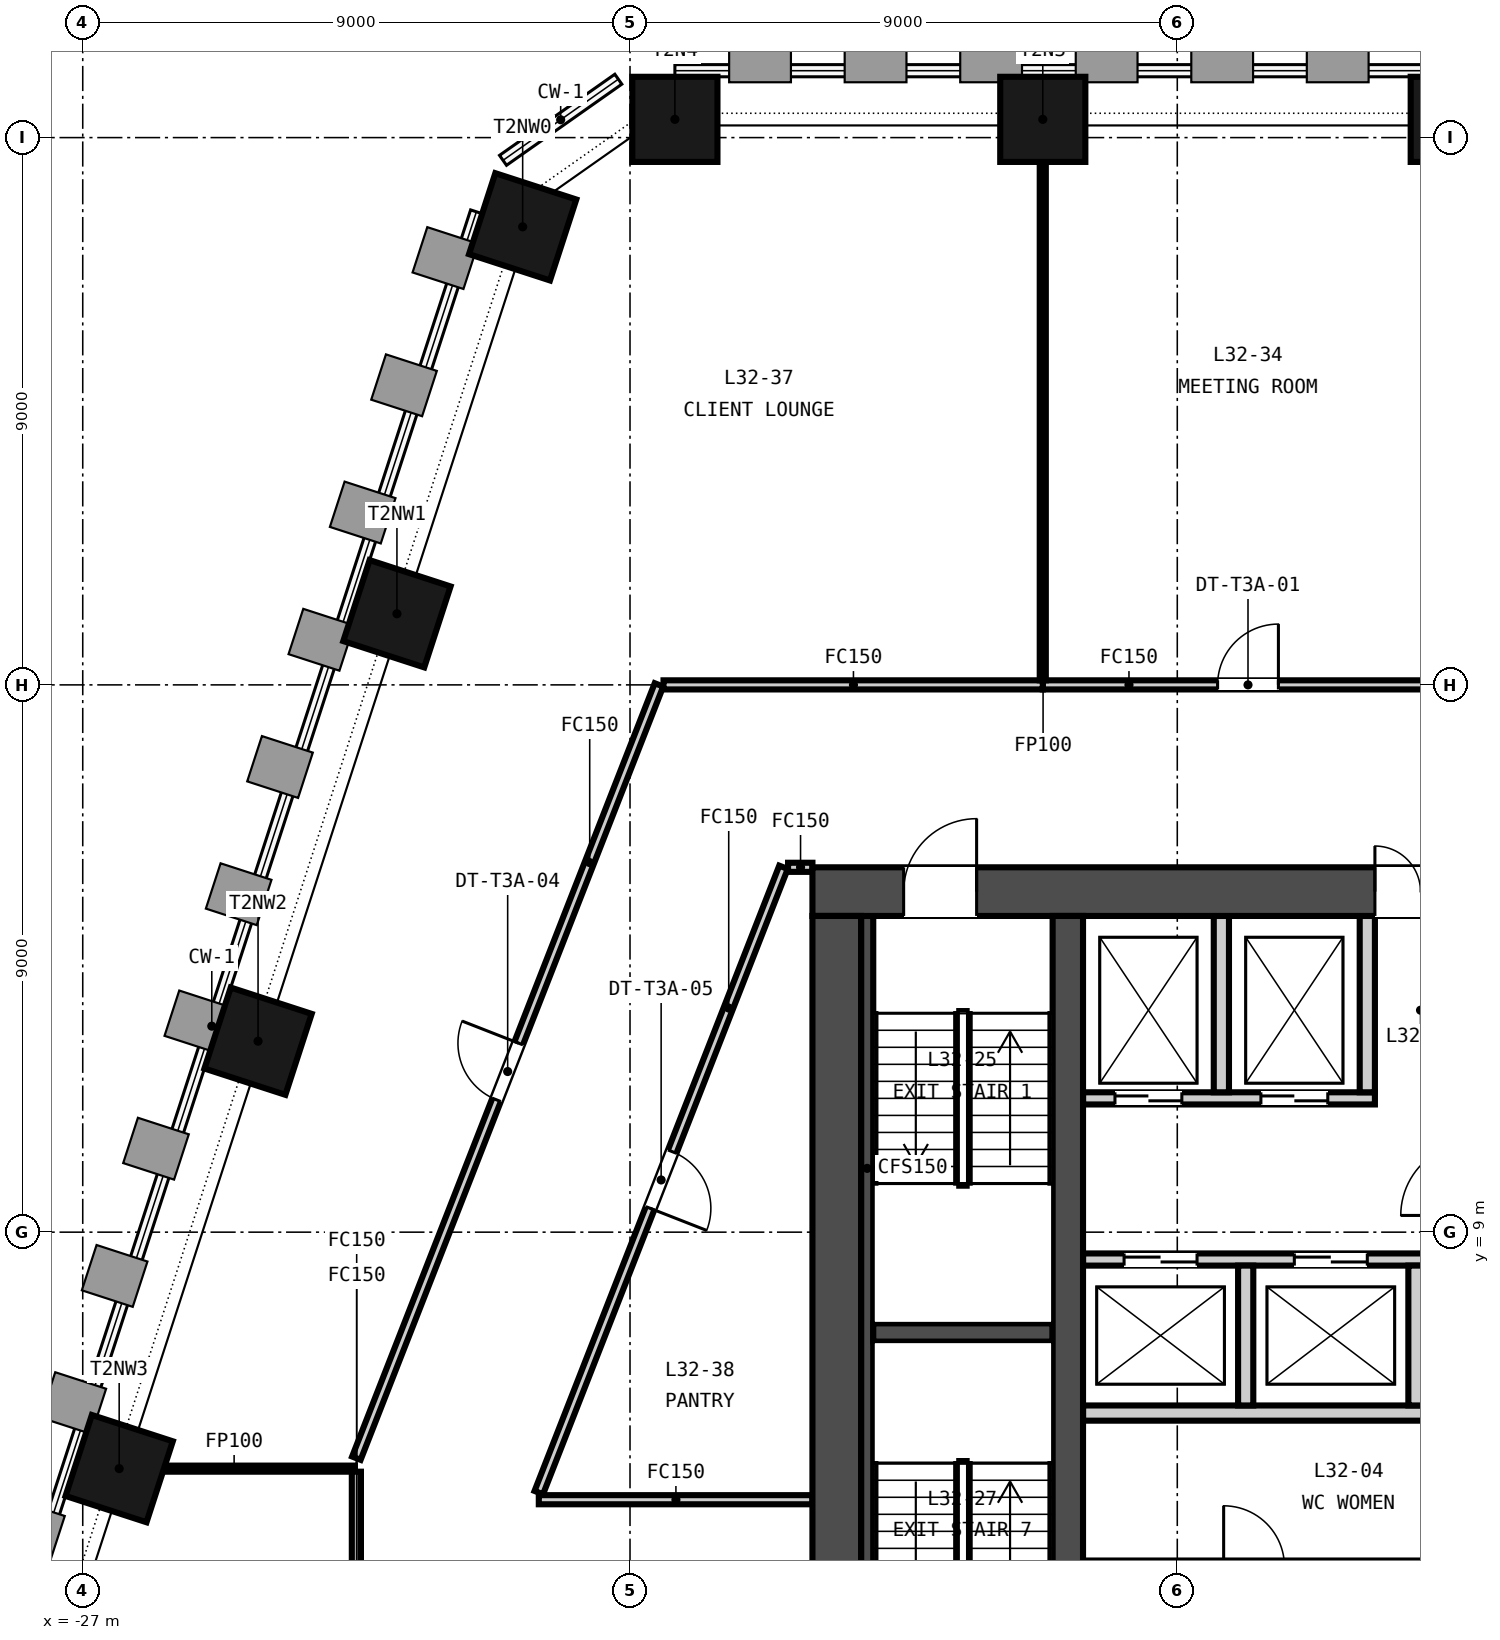
"""IFC4 building model, lengths in metres.
Left out: names, types, materials, properties, quantities, classifications, styles, units other than length and angle.
Written with IfcOpenShell. Run it as: python <this file> out.ifc"""

import sys

from ifc_helpers import new_model, si_unit, direction, frame, frame_2d, origin, origin_2d, place, context, subcontext, project, spatial, rectangle, extrude, element, fill, save


model = new_model("IFC4")
c1 = context("Model", 3, precision=1e-05, world=origin(), true_north=direction((0.0, 1.0)))
c2 = subcontext(c1, "Body", "Model", "MODEL_VIEW")
j1 = project(units=[si_unit("LENGTHUNIT", "METRE"), si_unit("PLANEANGLEUNIT", "RADIAN")], contexts=[c1])
p1 = place(None, origin())
s1 = spatial("IfcSite", under=j1, at=p1, CompositionType="ELEMENT")
p2 = place(p1, origin())
s2 = spatial("IfcBuilding", under=s1, at=p2, CompositionType="ELEMENT")
p3 = place(p2, frame((0.0, 0.0, 133.45)))
s3 = spatial("IfcBuildingStorey", under=s2, at=p3, CompositionType="ELEMENT", Elevation=133.45)
p4 = place(p3, frame((-15.0, 14.6, -0.15), z_axis=(0.0, 0.0, 1.0), x_axis=(1.0, 0.0, 0.0)))
e1 = element("IfcWall", 1, at=p4, inside=s3, PredefinedType="SOLIDWALL", context=c2, shape_type="SweptSolid", body=[
    extrude(rectangle(XDim=30.0, YDim=0.8, at=frame_2d((15.0, 0.0))), origin(), (0.0, 0.0, 1.0), 3.65),
])
p5 = place(p4, frame((9.25, 0.0, 0.15)))
e2 = element("IfcOpeningElement", 2, at=p5, cuts=e1, PredefinedType="OPENING", context=c2, shape_type="SweptSolid", body=[
    extrude(rectangle(XDim=1.5, YDim=2.1, at=frame_2d((0.75, 1.05))), frame((0.0, 0.41, 0.0), z_axis=(0.0, -1.0, 0.0), x_axis=(1.0, 0.0, 0.0)), (0.0, 0.0, 1.0), 0.82),
])
p6 = place(p4, frame((19.4, 0.0, 0.15)))
e3 = element("IfcOpeningElement", 3, at=p6, cuts=e1, PredefinedType="OPENING", context=c2, shape_type="SweptSolid", body=[
    extrude(rectangle(XDim=1.5, YDim=2.1, at=frame_2d((0.75, 1.05))), frame((0.0, 0.41, 0.0), z_axis=(0.0, -1.0, 0.0), x_axis=(1.0, 0.0, 0.0)), (0.0, 0.0, 1.0), 0.82),
])
p7 = place(p4, frame((1.5, 0.0, 0.15)))
e4 = element("IfcOpeningElement", 4, at=p7, cuts=e1, PredefinedType="OPENING", context=c2, shape_type="SweptSolid", body=[
    extrude(rectangle(XDim=1.2, YDim=2.1, at=frame_2d((0.6, 1.05))), frame((0.0, 0.41, 0.0), z_axis=(0.0, -1.0, 0.0), x_axis=(1.0, 0.0, 0.0)), (0.0, 0.0, 1.0), 0.82),
])
p8 = place(p4, frame((27.3, 0.0, 0.15)))
e5 = element("IfcOpeningElement", 5, at=p8, cuts=e1, PredefinedType="OPENING", context=c2, shape_type="SweptSolid", body=[
    extrude(rectangle(XDim=1.2, YDim=2.1, at=frame_2d((0.6, 1.05))), frame((0.0, 0.41, 0.0), z_axis=(0.0, -1.0, 0.0), x_axis=(1.0, 0.0, 0.0)), (0.0, 0.0, 1.0), 0.82),
])
p9 = place(p3, frame((-14.6, 0.8, -0.15), z_axis=(0.0, 0.0, 1.0), x_axis=(0.0, 1.0, 0.0)))
e6 = element("IfcWall", 6, at=p9, inside=s3, PredefinedType="SOLIDWALL", context=c2, shape_type="SweptSolid", body=[
    extrude(rectangle(XDim=13.4, YDim=0.8, at=frame_2d((6.7, 0.0))), origin(), (0.0, 0.0, 1.0), 3.65),
])
p10 = place(p3, frame((-10.8, 0.8, -0.15), z_axis=(0.0, 0.0, 1.0), x_axis=(0.0, 1.0, 0.0)))
e7 = element("IfcWall", 7, at=p10, inside=s3, PredefinedType="SOLIDWALL", context=c2, shape_type="SweptSolid", body=[
    extrude(rectangle(XDim=13.4, YDim=0.5, at=frame_2d((6.7, 0.0))), origin(), (0.0, 0.0, 1.0), 3.65),
])
for number, where, z_axis, x_axis in (
    (8, (-4.462, 27.3, -0.15), (0.0, 0.0, 1.0), (-1.0, 0.0, 0.0)),
    (9, (-11.212, 27.3, -0.15), (0.0, 0.0, 1.0), (-1.0, 0.0, 0.0)),
    (10, (-17.262, 27.3, -0.15), (0.0, 0.0, 1.0), (-1.0, 0.0, 0.0)),
    (11, (-19.765, 25.533, -0.15), (0.0, 0.0, 1.0), (-0.309, -0.951, 0.0)),
    (12, (-21.833, 19.17, -0.15), (0.0, 0.0, 1.0), (-0.309, -0.951, 0.0)),
    (13, (-24.117, 12.141, -0.15), (0.0, 0.0, 1.0), (-0.309, -0.951, 0.0)),
    (14, (-26.401, 5.111, -0.15), (0.0, 0.0, 1.0), (-0.309, -0.951, 0.0)),
):
    element("IfcColumn", number, at=place(p3, frame(where, z_axis=z_axis, x_axis=x_axis)), inside=s3, PredefinedType="COLUMN", context=c2, shape_type="SweptSolid", body=[
        extrude(rectangle(XDim=1.4, YDim=1.4, at=origin_2d()), origin(), (0.0, 0.0, 1.0), 3.65),
    ])
p11 = place(p3, frame((-10.55, 6.025, 0.0), z_axis=(0.0, 0.0, 1.0), x_axis=(1.0, 0.0, 0.0)))
e15 = element("IfcWall", 15, at=p11, inside=s3, PredefinedType="PARTITIONING", context=c2, shape_type="SweptSolid", body=[
    extrude(rectangle(XDim=21.1, YDim=0.25, at=frame_2d((10.55, 0.0))), origin(), (0.0, 0.0, 1.0), 3.5),
])
p12 = place(p3, frame((-10.55, 8.55, 0.0), z_axis=(0.0, 0.0, 1.0), x_axis=(1.0, 0.0, 0.0)))
e16 = element("IfcWall", 16, at=p12, inside=s3, PredefinedType="PARTITIONING", context=c2, shape_type="SweptSolid", body=[
    extrude(rectangle(XDim=21.1, YDim=0.2, at=frame_2d((10.55, 0.0))), origin(), (0.0, 0.0, 1.0), 3.5),
])
p13 = place(p12, frame((0.675, 0.0, 0.0)))
e17 = element("IfcOpeningElement", 17, at=p13, cuts=e16, PredefinedType="OPENING", context=c2, shape_type="SweptSolid", body=[
    extrude(rectangle(XDim=1.2, YDim=2.1, at=frame_2d((0.6, 1.05))), frame((0.0, 0.11, 0.0), z_axis=(0.0, -1.0, 0.0), x_axis=(1.0, 0.0, 0.0)), (0.0, 0.0, 1.0), 0.22),
])
p14 = place(p12, frame((3.475, 0.0, 0.0)))
e18 = element("IfcOpeningElement", 18, at=p14, cuts=e16, PredefinedType="OPENING", context=c2, shape_type="SweptSolid", body=[
    extrude(rectangle(XDim=1.2, YDim=2.1, at=frame_2d((0.6, 1.05))), frame((0.0, 0.11, 0.0), z_axis=(0.0, -1.0, 0.0), x_axis=(1.0, 0.0, 0.0)), (0.0, 0.0, 1.0), 0.22),
])
p15 = place(p12, frame((6.275, 0.0, 0.0)))
e19 = element("IfcOpeningElement", 19, at=p15, cuts=e16, PredefinedType="OPENING", context=c2, shape_type="SweptSolid", body=[
    extrude(rectangle(XDim=1.2, YDim=2.1, at=frame_2d((0.6, 1.05))), frame((0.0, 0.11, 0.0), z_axis=(0.0, -1.0, 0.0), x_axis=(1.0, 0.0, 0.0)), (0.0, 0.0, 1.0), 0.22),
])
p16 = place(p12, frame((9.075, 0.0, 0.0)))
e20 = element("IfcOpeningElement", 20, at=p16, cuts=e16, PredefinedType="OPENING", context=c2, shape_type="SweptSolid", body=[
    extrude(rectangle(XDim=1.2, YDim=2.1, at=frame_2d((0.6, 1.05))), frame((0.0, 0.11, 0.0), z_axis=(0.0, -1.0, 0.0), x_axis=(1.0, 0.0, 0.0)), (0.0, 0.0, 1.0), 0.22),
])
p17 = place(p12, frame((11.875, 0.0, 0.0)))
e21 = element("IfcOpeningElement", 21, at=p17, cuts=e16, PredefinedType="OPENING", context=c2, shape_type="SweptSolid", body=[
    extrude(rectangle(XDim=1.2, YDim=2.1, at=frame_2d((0.6, 1.05))), frame((0.0, 0.11, 0.0), z_axis=(0.0, -1.0, 0.0), x_axis=(1.0, 0.0, 0.0)), (0.0, 0.0, 1.0), 0.22),
])
p18 = place(p12, frame((14.675, 0.0, 0.0)))
e22 = element("IfcOpeningElement", 22, at=p18, cuts=e16, PredefinedType="OPENING", context=c2, shape_type="SweptSolid", body=[
    extrude(rectangle(XDim=1.2, YDim=2.1, at=frame_2d((0.6, 1.05))), frame((0.0, 0.11, 0.0), z_axis=(0.0, -1.0, 0.0), x_axis=(1.0, 0.0, 0.0)), (0.0, 0.0, 1.0), 0.22),
])
p19 = place(p12, frame((17.475, 0.0, 0.0)))
e23 = element("IfcOpeningElement", 23, at=p19, cuts=e16, PredefinedType="OPENING", context=c2, shape_type="SweptSolid", body=[
    extrude(rectangle(XDim=1.2, YDim=2.1, at=frame_2d((0.6, 1.05))), frame((0.0, 0.11, 0.0), z_axis=(0.0, -1.0, 0.0), x_axis=(1.0, 0.0, 0.0)), (0.0, 0.0, 1.0), 0.22),
])
p20 = place(p12, frame((19.9, 0.0, 0.0)))
e24 = element("IfcOpeningElement", 24, at=p20, cuts=e16, PredefinedType="OPENING", context=c2, shape_type="SweptSolid", body=[
    extrude(rectangle(XDim=0.9, YDim=2.1, at=frame_2d((0.45, 1.05))), frame((0.0, 0.11, 0.0), z_axis=(0.0, -1.0, 0.0), x_axis=(1.0, 0.0, 0.0)), (0.0, 0.0, 1.0), 0.22),
])
p21 = place(p3, frame((-10.55, 11.2, 0.0), z_axis=(0.0, 0.0, 1.0), x_axis=(1.0, 0.0, 0.0)))
e25 = element("IfcWall", 25, at=p21, inside=s3, PredefinedType="PARTITIONING", context=c2, shape_type="SweptSolid", body=[
    extrude(rectangle(XDim=4.8, YDim=0.2, at=frame_2d((2.4, 0.0))), origin(), (0.0, 0.0, 1.0), 3.5),
])
p22 = place(p21, frame((0.525, 0.0, 0.0)))
e26 = element("IfcOpeningElement", 26, at=p22, cuts=e25, PredefinedType="OPENING", context=c2, shape_type="SweptSolid", body=[
    extrude(rectangle(XDim=1.1, YDim=2.1, at=frame_2d((0.55, 1.05))), frame((0.0, 0.11, 0.0), z_axis=(0.0, -1.0, 0.0), x_axis=(1.0, 0.0, 0.0)), (0.0, 0.0, 1.0), 0.22),
])
p23 = place(p21, frame((2.925, 0.0, 0.0)))
e27 = element("IfcOpeningElement", 27, at=p23, cuts=e25, PredefinedType="OPENING", context=c2, shape_type="SweptSolid", body=[
    extrude(rectangle(XDim=1.1, YDim=2.1, at=frame_2d((0.55, 1.05))), frame((0.0, 0.11, 0.0), z_axis=(0.0, -1.0, 0.0), x_axis=(1.0, 0.0, 0.0)), (0.0, 0.0, 1.0), 0.22),
])
for number, where, z_axis, x_axis in (
    (28, (-7.875, 6.15, 0.0), (0.0, 0.0, 1.0), (0.0, 1.0, 0.0)),
    (29, (-5.075, 6.15, 0.0), (0.0, 0.0, 1.0), (0.0, 1.0, 0.0)),
):
    element("IfcWall", number, at=place(p3, frame(where, z_axis=z_axis, x_axis=x_axis)), inside=s3, PredefinedType="PARTITIONING", context=c2, shape_type="SweptSolid", body=[
        extrude(rectangle(XDim=2.3, YDim=0.25, at=frame_2d((1.15, 0.0))), origin(), (0.0, 0.0, 1.0), 3.5),
    ])
for number, where, z_axis, x_axis in (
    (30, (-8.275, 11.3, 0.0), (0.0, 0.0, 1.0), (0.0, 1.0, 0.0)),
    (31, (-5.875, 11.3, 0.0), (0.0, 0.0, 1.0), (0.0, 1.0, 0.0)),
):
    element("IfcWall", number, at=place(p3, frame(where, z_axis=z_axis, x_axis=x_axis)), inside=s3, PredefinedType="PARTITIONING", context=c2, shape_type="SweptSolid", body=[
        extrude(rectangle(XDim=2.9, YDim=0.25, at=frame_2d((1.45, 0.0))), origin(), (0.0, 0.0, 1.0), 3.5),
    ])
p24 = place(p3, frame((-14.0, 7.35, 0.0), z_axis=(0.0, 0.0, 1.0), x_axis=(1.0, 0.0, 0.0)))
e32 = element("IfcWall", 32, at=p24, inside=s3, PredefinedType="SOLIDWALL", context=c2, shape_type="SweptSolid", body=[
    extrude(rectangle(XDim=2.95, YDim=0.3, at=frame_2d((1.475, 0.0))), origin(), (0.0, 0.0, 1.0), 3.5),
])
p25 = place(p3, frame((-14.1, 0.8, 0.0), z_axis=(0.0, 0.0, 1.0), x_axis=(0.0, 1.0, 0.0)))
e33 = element("IfcWall", 33, at=p25, inside=s3, PredefinedType="SOLIDWALL", context=c2, shape_type="SweptSolid", body=[
    extrude(rectangle(XDim=13.4, YDim=0.2, at=frame_2d((6.7, 0.0))), origin(), (0.0, 0.0, 1.0), 3.5),
])
p26 = place(p3, frame((-15.476, 15.0, 0.0), z_axis=(0.0, 0.0, 1.0), x_axis=(-0.364411853206, -0.931237886494, 0.0)))
e34 = element("IfcWall", 34, at=p26, inside=s3, PredefinedType="PARTITIONING", context=c2, shape_type="SweptSolid", body=[
    extrude(rectangle(XDim=11.042, YDim=0.15, at=frame_2d((5.521, 0.0))), origin(), (0.0, 0.0, 1.0), 2.741),
])
p27 = place(p26, frame((5.021, 0.0, 0.0)))
e35 = element("IfcOpeningElement", 35, at=p27, cuts=e34, PredefinedType="OPENING", context=c2, shape_type="SweptSolid", body=[
    extrude(rectangle(XDim=1.0, YDim=2.1, at=frame_2d((0.5, 1.05))), frame((0.0, 0.085, 0.0), z_axis=(0.0, -1.0, 0.0), x_axis=(1.0, 0.0, 0.0)), (0.0, 0.0, 1.0), 0.17),
])
p28 = place(p3, frame((-15.0, 15.0, 0.0), z_axis=(0.0, 0.0, 1.0), x_axis=(-1.0, 0.0, 0.0)))
e36 = element("IfcWall", 36, at=p28, inside=s3, PredefinedType="PARTITIONING", context=c2, shape_type="SweptSolid", body=[
    extrude(rectangle(XDim=0.401, YDim=0.15, at=frame_2d((0.2, 0.0))), origin(), (0.0, 0.0, 1.0), 2.741),
])
p29 = place(p3, frame((-11.212, 18.0, 0.0), z_axis=(0.0, 0.0, 1.0), x_axis=(1.0, 0.0, 0.0)))
e37 = element("IfcWall", 37, at=p29, inside=s3, PredefinedType="PARTITIONING", context=c2, shape_type="SweptSolid", body=[
    extrude(rectangle(XDim=6.75, YDim=0.15, at=frame_2d((3.375, 0.0))), origin(), (0.0, 0.0, 1.0), 2.741),
])
p30 = place(p29, frame((2.875, 0.0, 0.0)))
e38 = element("IfcOpeningElement", 38, at=p30, cuts=e37, PredefinedType="OPENING", context=c2, shape_type="SweptSolid", body=[
    extrude(rectangle(XDim=1.0, YDim=2.1, at=frame_2d((0.5, 1.05))), frame((0.0, 0.085, 0.0), z_axis=(0.0, -1.0, 0.0), x_axis=(1.0, 0.0, 0.0)), (0.0, 0.0, 1.0), 0.17),
])
p31 = place(p3, frame((-22.5, 5.283, 0.0), z_axis=(0.0, 0.0, 1.0), x_axis=(0.364389237236, 0.931246736256, 0.0)))
e39 = element("IfcWall", 39, at=p31, inside=s3, PredefinedType="PARTITIONING", context=c2, shape_type="SweptSolid", body=[
    extrude(rectangle(XDim=13.656, YDim=0.15, at=frame_2d((6.828, 0.0))), origin(), (0.0, 0.0, 1.0), 2.741),
])
p32 = place(p31, frame((6.328, 0.0, 0.0)))
e40 = element("IfcOpeningElement", 40, at=p32, cuts=e39, PredefinedType="OPENING", context=c2, shape_type="SweptSolid", body=[
    extrude(rectangle(XDim=1.0, YDim=2.1, at=frame_2d((0.5, 1.05))), frame((0.0, 0.085, 0.0), z_axis=(0.0, -1.0, 0.0), x_axis=(1.0, 0.0, 0.0)), (0.0, 0.0, 1.0), 0.17),
])
p33 = place(p3, frame((-17.449, 18.0, 0.0), z_axis=(0.0, 0.0, 1.0), x_axis=(1.0, 0.0, 0.0)))
e41 = element("IfcWall", 41, at=p33, inside=s3, PredefinedType="PARTITIONING", context=c2, shape_type="SweptSolid", body=[
    extrude(rectangle(XDim=6.237, YDim=0.15, at=frame_2d((3.119, 0.0))), origin(), (0.0, 0.0, 1.0), 2.741),
])
p34 = place(p3, frame((-11.212, 18.075, 0.0), z_axis=(0.0, 0.0, 1.0), x_axis=(0.0, 1.0, 0.0)))
e42 = element("IfcWall", 42, at=p34, inside=s3, PredefinedType="PARTITIONING", context=c2, shape_type="SweptSolid", body=[
    extrude(rectangle(XDim=9.325, YDim=0.1, at=frame_2d((4.663, 0.0))), origin(), (0.0, 0.0, 1.0), 2.741),
])
p35 = place(p3, frame((-26.506, 5.111, 0.0), z_axis=(0.0, 0.0, 1.0), x_axis=(1.0, 0.0, 0.0)))
e43 = element("IfcWall", 43, at=p35, inside=s3, PredefinedType="PARTITIONING", context=c2, shape_type="SweptSolid", body=[
    extrude(rectangle(XDim=3.981, YDim=0.1, at=frame_2d((1.991, 0.0))), origin(), (0.0, 0.0, 1.0), 2.741),
])
p36 = place(p3, frame((-19.5, 4.6, 0.0), z_axis=(0.0, 0.0, 1.0), x_axis=(1.0, 0.0, 0.0)))
e44 = element("IfcWall", 44, at=p36, inside=s3, PredefinedType="PARTITIONING", context=c2, shape_type="SweptSolid", body=[
    extrude(rectangle(XDim=4.5, YDim=0.15, at=frame_2d((2.25, 0.0))), origin(), (0.0, 0.0, 1.0), 2.741),
])
p37 = place(p3, frame((-22.5, 0.0, 0.0), z_axis=(0.0, 0.0, 1.0), x_axis=(0.0, 1.0, 0.0)))
e45 = element("IfcWall", 45, at=p37, inside=s3, PredefinedType="PARTITIONING", context=c2, shape_type="SweptSolid", body=[
    extrude(rectangle(XDim=5.061, YDim=0.15, at=frame_2d((2.531, 0.0))), origin(), (0.0, 0.0, 1.0), 2.741),
])
p38 = place(p13, origin())
e46 = element("IfcDoor", 46, at=p38, inside=s3, OperationType="DOUBLE_DOOR_SLIDING", PredefinedType="DOOR", context=c2, shape_type="SweptSolid", body=[
    extrude(rectangle(XDim=1.2, YDim=2.1, at=frame_2d((0.6, 1.05))), frame((0.0, 0.025, 0.0), z_axis=(0.0, -1.0, 0.0), x_axis=(1.0, 0.0, 0.0)), (0.0, 0.0, 1.0), 0.05),
])
fill(e17, e46)
p39 = place(p14, origin())
e47 = element("IfcDoor", 47, at=p39, inside=s3, OperationType="DOUBLE_DOOR_SLIDING", PredefinedType="DOOR", context=c2, shape_type="SweptSolid", body=[
    extrude(rectangle(XDim=1.2, YDim=2.1, at=frame_2d((0.6, 1.05))), frame((0.0, 0.025, 0.0), z_axis=(0.0, -1.0, 0.0), x_axis=(1.0, 0.0, 0.0)), (0.0, 0.0, 1.0), 0.05),
])
fill(e18, e47)
p40 = place(p22, origin())
e48 = element("IfcDoor", 48, at=p40, inside=s3, OperationType="DOUBLE_DOOR_SLIDING", PredefinedType="DOOR", context=c2, shape_type="SweptSolid", body=[
    extrude(rectangle(XDim=1.1, YDim=2.1, at=frame_2d((0.55, 1.05))), frame((0.0, 0.025, 0.0), z_axis=(0.0, -1.0, 0.0), x_axis=(1.0, 0.0, 0.0)), (0.0, 0.0, 1.0), 0.05),
])
fill(e26, e48)
p41 = place(p23, origin())
e49 = element("IfcDoor", 49, at=p41, inside=s3, OperationType="DOUBLE_DOOR_SLIDING", PredefinedType="DOOR", context=c2, shape_type="SweptSolid", body=[
    extrude(rectangle(XDim=1.1, YDim=2.1, at=frame_2d((0.55, 1.05))), frame((0.0, 0.025, 0.0), z_axis=(0.0, -1.0, 0.0), x_axis=(1.0, 0.0, 0.0)), (0.0, 0.0, 1.0), 0.05),
])
fill(e27, e49)
p42 = place(p5, origin())
e50 = element("IfcDoor", 50, at=p42, inside=s3, OperationType="DOUBLE_DOOR_SINGLE_SWING", PredefinedType="DOOR", context=c2, shape_type="SweptSolid", body=[
    extrude(rectangle(XDim=1.5, YDim=2.1, at=frame_2d((0.75, 1.05))), frame((0.0, 0.025, 0.0), z_axis=(0.0, -1.0, 0.0), x_axis=(1.0, 0.0, 0.0)), (0.0, 0.0, 1.0), 0.05),
])
fill(e2, e50)
p43 = place(p7, origin())
e51 = element("IfcDoor", 51, at=p43, inside=s3, OperationType="SINGLE_SWING_RIGHT", PredefinedType="DOOR", context=c2, shape_type="SweptSolid", body=[
    extrude(rectangle(XDim=1.2, YDim=2.1, at=frame_2d((0.6, 1.05))), frame((0.0, 0.025, 0.0), z_axis=(0.0, -1.0, 0.0), x_axis=(1.0, 0.0, 0.0)), (0.0, 0.0, 1.0), 0.05),
])
fill(e4, e51)
p44 = place(p30, origin())
e52 = element("IfcDoor", 52, at=p44, inside=s3, OperationType="SINGLE_SWING_RIGHT", PredefinedType="DOOR", context=c2, shape_type="SweptSolid", body=[
    extrude(rectangle(XDim=1.0, YDim=2.1, at=frame_2d((0.5, 1.05))), frame((0.0, 0.025, 0.0), z_axis=(0.0, -1.0, 0.0), x_axis=(1.0, 0.0, 0.0)), (0.0, 0.0, 1.0), 0.05),
])
fill(e38, e52)
p45 = place(p32, origin())
e53 = element("IfcDoor", 53, at=p45, inside=s3, OperationType="SINGLE_SWING_RIGHT", PredefinedType="DOOR", context=c2, shape_type="SweptSolid", body=[
    extrude(rectangle(XDim=1.0, YDim=2.1, at=frame_2d((0.5, 1.05))), frame((0.0, 0.025, 0.0), z_axis=(0.0, -1.0, 0.0), x_axis=(1.0, 0.0, 0.0)), (0.0, 0.0, 1.0), 0.05),
])
fill(e40, e53)
p46 = place(p27, origin())
e54 = element("IfcDoor", 54, at=p46, inside=s3, OperationType="SINGLE_SWING_RIGHT", PredefinedType="DOOR", context=c2, shape_type="SweptSolid", body=[
    extrude(rectangle(XDim=1.0, YDim=2.1, at=frame_2d((0.5, 1.05))), frame((0.0, 0.025, 0.0), z_axis=(0.0, -1.0, 0.0), x_axis=(1.0, 0.0, 0.0)), (0.0, 0.0, 1.0), 0.05),
])
fill(e35, e54)
save(model, sys.argv[1])
